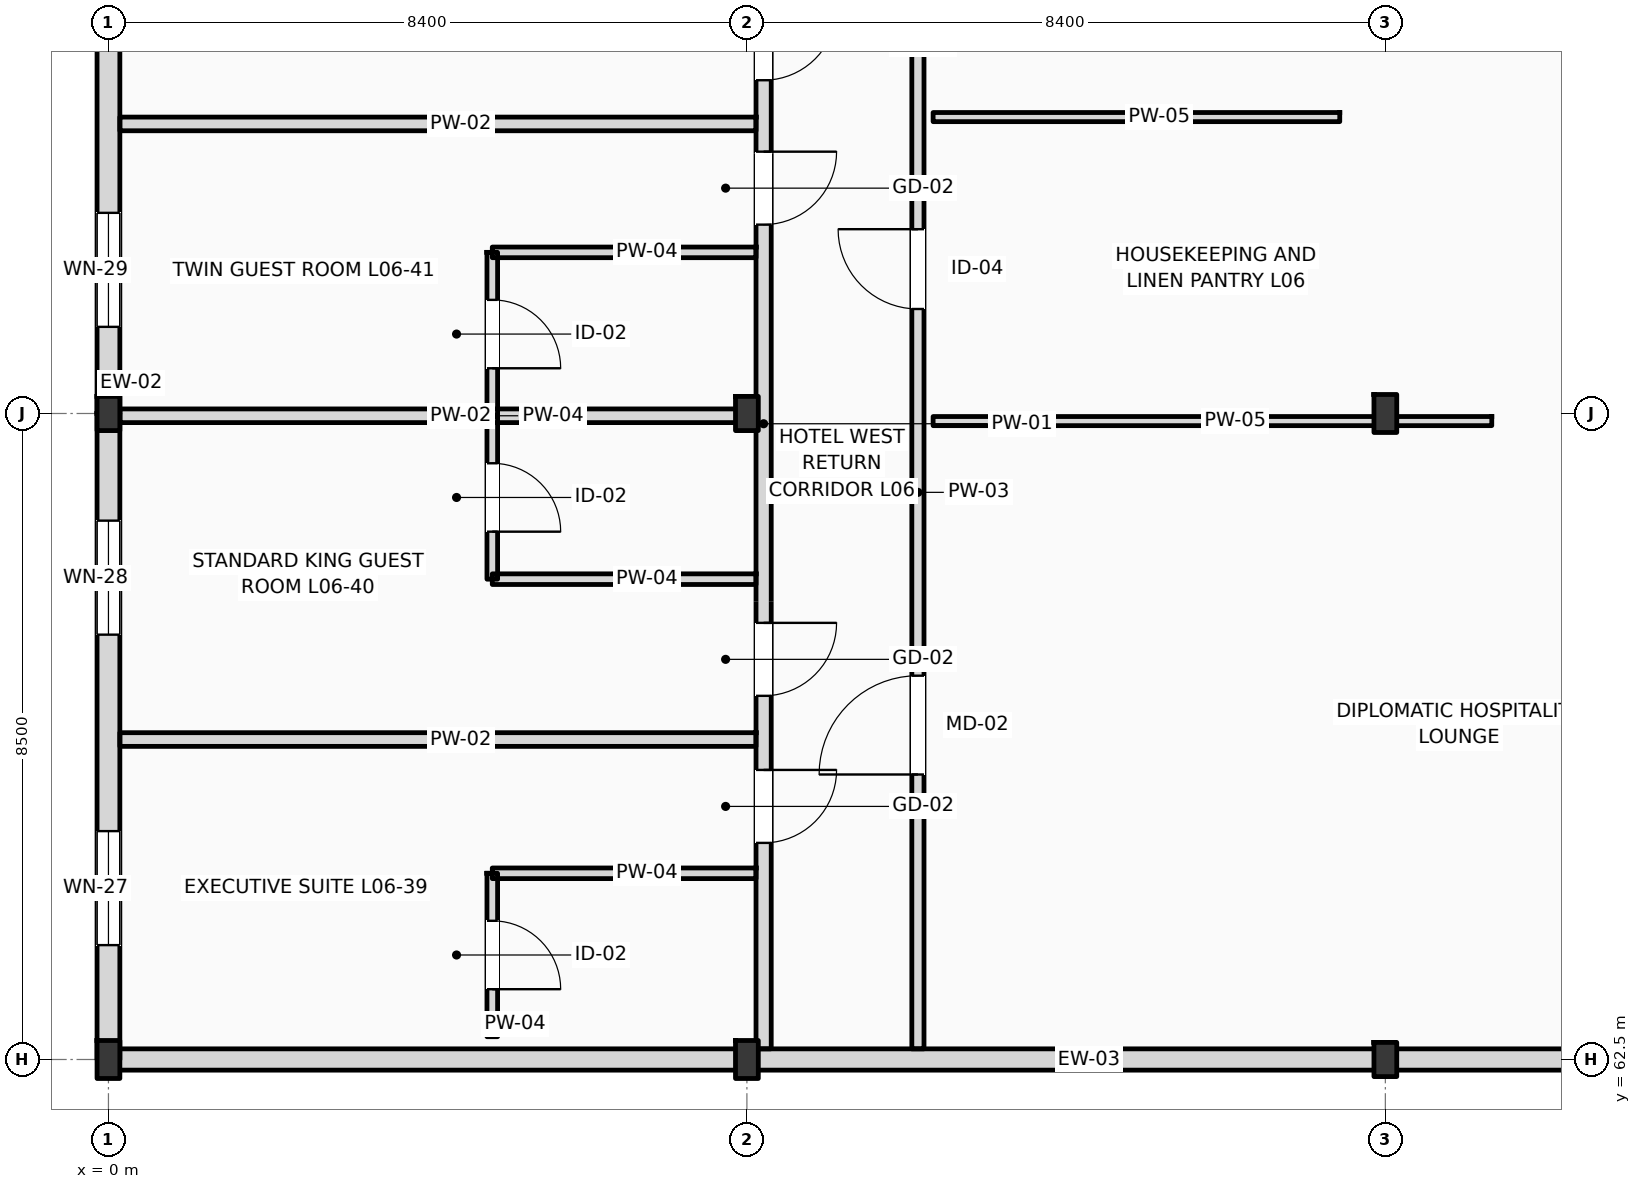
"""IFC4 building model, lengths in metres.
Left out: names, types, materials, properties, quantities, classifications, styles, units other than length and angle.
Written with IfcOpenShell. Run it as: python <this file> out.ifc"""

import sys

from ifc_helpers import new_model, si_unit, direction, frame, frame_2d, origin, origin_2d, place, context, subcontext, project, spatial, rectangle, i_section, extrude, element, fill, save


model = new_model("IFC4")
c1 = context("Model", 3, precision=1e-05, world=origin(), true_north=direction((0.0, 1.0)))
c2 = subcontext(c1, "Body", "Model", "MODEL_VIEW")
j1 = project(units=[si_unit("LENGTHUNIT", "METRE"), si_unit("PLANEANGLEUNIT", "RADIAN")], contexts=[c1])
p1 = place(None, origin())
s1 = spatial("IfcSite", under=j1, at=p1, CompositionType="ELEMENT")
p2 = place(p1, origin())
s2 = spatial("IfcBuilding", under=s1, at=p2, CompositionType="ELEMENT")
p3 = place(p2, frame((0.0, 0.0, 28.2)))
s3 = spatial("IfcBuildingStorey", under=s2, at=p3, CompositionType="ELEMENT", Elevation=28.2)
p4 = place(p3, frame((0.0, 62.5, 0.0), z_axis=(0.0, 0.0, 1.0), x_axis=(1.0, 0.0, 0.0)))
e1 = element("IfcColumn", 1, at=p4, inside=s3, PredefinedType="COLUMN", context=c2, shape_type="SweptSolid", body=[
    extrude(i_section(OverallWidth=0.3, OverallDepth=0.5, WebThickness=0.014, FlangeThickness=0.028, FilletRadius=0.027, at=origin_2d()), origin(), (0.0, 0.0, 1.0), 3.6),
])
p5 = place(p3, frame((0.0, 71.0, 0.0), z_axis=(0.0, 0.0, 1.0), x_axis=(1.0, 0.0, 0.0)))
e2 = element("IfcColumn", 2, at=p5, inside=s3, PredefinedType="COLUMN", context=c2, shape_type="SweptSolid", body=[
    extrude(i_section(OverallWidth=0.3, OverallDepth=0.45, WebThickness=0.014, FlangeThickness=0.026, FilletRadius=0.027, at=origin_2d()), origin(), (0.0, 0.0, 1.0), 3.6),
])
p6 = place(p3, frame((8.4, 62.5, 0.0), z_axis=(0.0, 0.0, 1.0), x_axis=(1.0, 0.0, 0.0)))
e3 = element("IfcColumn", 3, at=p6, inside=s3, PredefinedType="COLUMN", context=c2, shape_type="SweptSolid", body=[
    extrude(i_section(OverallWidth=0.3, OverallDepth=0.5, WebThickness=0.014, FlangeThickness=0.028, FilletRadius=0.027, at=origin_2d()), origin(), (0.0, 0.0, 1.0), 3.6),
])
for number, where, z_axis, x_axis in (
    (4, (8.4, 71.0, 0.0), (0.0, 0.0, 1.0), (1.0, 0.0, 0.0)),
    (5, (16.8, 62.5, 0.0), (0.0, 0.0, 1.0), (1.0, 0.0, 0.0)),
):
    element("IfcColumn", number, at=place(p3, frame(where, z_axis=z_axis, x_axis=x_axis)), inside=s3, PredefinedType="COLUMN", context=c2, shape_type="SweptSolid", body=[
        extrude(i_section(OverallWidth=0.3, OverallDepth=0.45, WebThickness=0.014, FlangeThickness=0.026, FilletRadius=0.027, at=origin_2d()), origin(), (0.0, 0.0, 1.0), 3.6),
    ])
p7 = place(p3, frame((16.8, 71.0, 0.0), z_axis=(0.0, 0.0, 1.0), x_axis=(1.0, 0.0, 0.0)))
e6 = element("IfcColumn", 6, at=p7, inside=s3, PredefinedType="COLUMN", context=c2, shape_type="SweptSolid", body=[
    extrude(i_section(OverallWidth=0.3, OverallDepth=0.5, WebThickness=0.014, FlangeThickness=0.028, FilletRadius=0.027, at=origin_2d()), origin(), (0.0, 0.0, 1.0), 3.6),
])
p8 = place(p3, frame((0.0, 62.5, 0.0), z_axis=(0.0, 0.0, 1.0), x_axis=(0.0, 1.0, 0.0)))
e7 = element("IfcWall", 7, at=p8, inside=s3, PredefinedType="STANDARD", context=c2, shape_type="SweptSolid", body=[
    extrude(rectangle(XDim=8.5, YDim=0.3, at=frame_2d((4.25, 0.0))), origin(), (0.0, 0.0, 1.0), 2.99),
])
p9 = place(p8, frame((1.505, 0.0, 0.9)))
e8 = element("IfcOpeningElement", 8, at=p9, cuts=e7, PredefinedType="OPENING", context=c2, shape_type="SweptSolid", body=[
    extrude(rectangle(XDim=1.5, YDim=1.91, at=frame_2d((0.75, 0.955))), frame((0.0, 0.16, 0.0), z_axis=(0.0, -1.0, 0.0), x_axis=(1.0, 0.0, 0.0)), (0.0, 0.0, 1.0), 0.32),
])
p10 = place(p8, frame((5.59, 0.0, 0.9)))
e9 = element("IfcOpeningElement", 9, at=p10, cuts=e7, PredefinedType="OPENING", context=c2, shape_type="SweptSolid", body=[
    extrude(rectangle(XDim=1.5, YDim=1.91, at=frame_2d((0.75, 0.955))), frame((0.0, 0.16, 0.0), z_axis=(0.0, -1.0, 0.0), x_axis=(1.0, 0.0, 0.0)), (0.0, 0.0, 1.0), 0.32),
])
p11 = place(p3, frame((0.0, 71.0, 0.0), z_axis=(0.0, 0.0, 1.0), x_axis=(0.0, 1.0, 0.0)))
e10 = element("IfcWall", 10, at=p11, inside=s3, PredefinedType="STANDARD", context=c2, shape_type="SweptSolid", body=[
    extrude(rectangle(XDim=8.5, YDim=0.3, at=frame_2d((4.25, 0.0))), origin(), (0.0, 0.0, 1.0), 2.99),
])
p12 = place(p11, frame((1.14, 0.0, 0.9)))
e11 = element("IfcOpeningElement", 11, at=p12, cuts=e10, PredefinedType="OPENING", context=c2, shape_type="SweptSolid", body=[
    extrude(rectangle(XDim=1.5, YDim=1.91, at=frame_2d((0.75, 0.955))), frame((0.0, 0.16, 0.0), z_axis=(0.0, -1.0, 0.0), x_axis=(1.0, 0.0, 0.0)), (0.0, 0.0, 1.0), 0.32),
])
p13 = place(p11, frame((5.19, 0.0, 0.9)))
e12 = element("IfcOpeningElement", 12, at=p13, cuts=e10, PredefinedType="OPENING", context=c2, shape_type="SweptSolid", body=[
    extrude(rectangle(XDim=1.5, YDim=1.91, at=frame_2d((0.75, 0.955))), frame((0.0, 0.16, 0.0), z_axis=(0.0, -1.0, 0.0), x_axis=(1.0, 0.0, 0.0)), (0.0, 0.0, 1.0), 0.32),
])
p14 = place(p3, frame((0.0, 62.5, 0.0), z_axis=(0.0, 0.0, 1.0), x_axis=(1.0, 0.0, 0.0)))
e13 = element("IfcWall", 13, at=p14, inside=s3, PredefinedType="STANDARD", context=c2, shape_type="SweptSolid", body=[
    extrude(rectangle(XDim=25.2, YDim=0.28, at=frame_2d((12.6, 0.0))), origin(), (0.0, 0.0, 1.0), 2.8),
])
p15 = place(p3, frame((8.62, 62.64, 0.0), z_axis=(0.0, 0.0, 1.0), x_axis=(0.0, 1.0, 0.0)))
e14 = element("IfcWall", 14, at=p15, inside=s3, PredefinedType="PARTITIONING", context=c2, shape_type="SweptSolid", body=[
    extrude(rectangle(XDim=32.66, YDim=0.2, at=frame_2d((16.33, 0.0))), origin(), (0.0, 0.0, 1.0), 2.99),
])
p16 = place(p15, frame((2.71, 0.0, 0.0)))
e15 = element("IfcOpeningElement", 15, at=p16, cuts=e14, PredefinedType="OPENING", context=c2, shape_type="SweptSolid", body=[
    extrude(rectangle(XDim=0.96, YDim=2.2, at=frame_2d((0.48, 1.1))), frame((0.0, 0.11, 0.0), z_axis=(0.0, -1.0, 0.0), x_axis=(1.0, 0.0, 0.0)), (0.0, 0.0, 1.0), 0.22),
])
p17 = place(p15, frame((4.645, 0.0, 0.0)))
e16 = element("IfcOpeningElement", 16, at=p17, cuts=e14, PredefinedType="OPENING", context=c2, shape_type="SweptSolid", body=[
    extrude(rectangle(XDim=0.96, YDim=2.2, at=frame_2d((0.48, 1.1))), frame((0.0, 0.11, 0.0), z_axis=(0.0, -1.0, 0.0), x_axis=(1.0, 0.0, 0.0)), (0.0, 0.0, 1.0), 0.22),
])
p18 = place(p15, frame((10.845, 0.0, 0.0)))
e17 = element("IfcOpeningElement", 17, at=p18, cuts=e14, PredefinedType="OPENING", context=c2, shape_type="SweptSolid", body=[
    extrude(rectangle(XDim=0.96, YDim=2.2, at=frame_2d((0.48, 1.1))), frame((0.0, 0.11, 0.0), z_axis=(0.0, -1.0, 0.0), x_axis=(1.0, 0.0, 0.0)), (0.0, 0.0, 1.0), 0.22),
])
p19 = place(p15, frame((12.745, 0.0, 0.0)))
e18 = element("IfcOpeningElement", 18, at=p19, cuts=e14, PredefinedType="OPENING", context=c2, shape_type="SweptSolid", body=[
    extrude(rectangle(XDim=0.96, YDim=2.2, at=frame_2d((0.48, 1.1))), frame((0.0, 0.11, 0.0), z_axis=(0.0, -1.0, 0.0), x_axis=(1.0, 0.0, 0.0)), (0.0, 0.0, 1.0), 0.22),
])
p20 = place(p15, frame((18.945, 0.0, 0.0)))
e19 = element("IfcOpeningElement", 19, at=p20, cuts=e14, PredefinedType="OPENING", context=c2, shape_type="SweptSolid", body=[
    extrude(rectangle(XDim=0.96, YDim=2.2, at=frame_2d((0.48, 1.1))), frame((0.0, 0.11, 0.0), z_axis=(0.0, -1.0, 0.0), x_axis=(1.0, 0.0, 0.0)), (0.0, 0.0, 1.0), 0.22),
])
p21 = place(p15, frame((22.995, 0.0, 0.0)))
e20 = element("IfcOpeningElement", 20, at=p21, cuts=e14, PredefinedType="OPENING", context=c2, shape_type="SweptSolid", body=[
    extrude(rectangle(XDim=0.96, YDim=2.2, at=frame_2d((0.48, 1.1))), frame((0.0, 0.11, 0.0), z_axis=(0.0, -1.0, 0.0), x_axis=(1.0, 0.0, 0.0)), (0.0, 0.0, 1.0), 0.22),
])
p22 = place(p15, frame((27.045, 0.0, 0.0)))
e21 = element("IfcOpeningElement", 21, at=p22, cuts=e14, PredefinedType="OPENING", context=c2, shape_type="SweptSolid", body=[
    extrude(rectangle(XDim=0.96, YDim=2.2, at=frame_2d((0.48, 1.1))), frame((0.0, 0.11, 0.0), z_axis=(0.0, -1.0, 0.0), x_axis=(1.0, 0.0, 0.0)), (0.0, 0.0, 1.0), 0.22),
])
p23 = place(p15, frame((31.06, 0.0, 0.0)))
e22 = element("IfcOpeningElement", 22, at=p23, cuts=e14, PredefinedType="OPENING", context=c2, shape_type="SweptSolid", body=[
    extrude(rectangle(XDim=0.96, YDim=2.2, at=frame_2d((0.48, 1.1))), frame((0.0, 0.11, 0.0), z_axis=(0.0, -1.0, 0.0), x_axis=(1.0, 0.0, 0.0)), (0.0, 0.0, 1.0), 0.22),
])
p24 = place(p3, frame((10.65, 62.64, 0.0), z_axis=(0.0, 0.0, 1.0), x_axis=(0.0, 1.0, 0.0)))
e23 = element("IfcWall", 23, at=p24, inside=s3, PredefinedType="PARTITIONING", context=c2, shape_type="SweptSolid", body=[
    extrude(rectangle(XDim=16.31, YDim=0.16, at=frame_2d((8.155, 0.0))), origin(), (0.0, 0.0, 1.0), 3.36),
])
p25 = place(p24, frame((3.61, 0.0, 0.0)))
e24 = element("IfcOpeningElement", 24, at=p25, cuts=e23, PredefinedType="OPENING", context=c2, shape_type="SweptSolid", body=[
    extrude(rectangle(XDim=1.3, YDim=2.2, at=frame_2d((0.65, 1.1))), frame((0.0, 0.09, 0.0), z_axis=(0.0, -1.0, 0.0), x_axis=(1.0, 0.0, 0.0)), (0.0, 0.0, 1.0), 0.18),
])
p26 = place(p24, frame((9.735, 0.0, 0.0)))
e25 = element("IfcOpeningElement", 25, at=p26, cuts=e23, PredefinedType="OPENING", context=c2, shape_type="SweptSolid", body=[
    extrude(rectangle(XDim=1.05, YDim=2.12, at=frame_2d((0.525, 1.06))), frame((0.0, 0.09, 0.0), z_axis=(0.0, -1.0, 0.0), x_axis=(1.0, 0.0, 0.0)), (0.0, 0.0, 1.0), 0.18),
])
p27 = place(p24, frame((13.49, 0.0, 0.0)))
e26 = element("IfcOpeningElement", 26, at=p27, cuts=e23, PredefinedType="OPENING", context=c2, shape_type="SweptSolid", body=[
    extrude(rectangle(XDim=0.94, YDim=2.15, at=frame_2d((0.47, 1.075))), frame((0.0, 0.09, 0.0), z_axis=(0.0, -1.0, 0.0), x_axis=(1.0, 0.0, 0.0)), (0.0, 0.0, 1.0), 0.18),
])
p28 = place(p3, frame((0.15, 66.71, 0.0), z_axis=(0.0, 0.0, 1.0), x_axis=(1.0, 0.0, 0.0)))
e27 = element("IfcWall", 27, at=p28, inside=s3, PredefinedType="PARTITIONING", context=c2, shape_type="SweptSolid", body=[
    extrude(rectangle(XDim=8.37, YDim=0.18, at=frame_2d((4.185, 0.0))), origin(), (0.0, 0.0, 1.0), 3.36),
])
p29 = place(p3, frame((5.05, 64.95, 0.0), z_axis=(0.0, 0.0, 1.0), x_axis=(1.0, 0.0, 0.0)))
e28 = element("IfcWall", 28, at=p29, inside=s3, PredefinedType="PARTITIONING", context=c2, shape_type="SweptSolid", body=[
    extrude(rectangle(XDim=3.47, YDim=0.14, at=frame_2d((1.735, 0.0))), origin(), (0.0, 0.0, 1.0), 3.36),
])
p30 = place(p3, frame((5.05, 62.8, 0.0), z_axis=(0.0, 0.0, 1.0), x_axis=(0.0, 1.0, 0.0)))
e29 = element("IfcWall", 29, at=p30, inside=s3, PredefinedType="PARTITIONING", context=c2, shape_type="SweptSolid", body=[
    extrude(rectangle(XDim=2.15, YDim=0.14, at=frame_2d((1.075, 0.0))), origin(), (0.0, 0.0, 1.0), 3.36),
])
p31 = place(p30, frame((0.625, 0.0, 0.0)))
e30 = element("IfcOpeningElement", 30, at=p31, cuts=e29, PredefinedType="OPENING", context=c2, shape_type="SweptSolid", body=[
    extrude(rectangle(XDim=0.9, YDim=2.1, at=frame_2d((0.45, 1.05))), frame((0.0, 0.08, 0.0), z_axis=(0.0, -1.0, 0.0), x_axis=(1.0, 0.0, 0.0)), (0.0, 0.0, 1.0), 0.16),
])
p32 = place(p3, frame((0.15, 70.97, 0.0), z_axis=(0.0, 0.0, 1.0), x_axis=(1.0, 0.0, 0.0)))
e31 = element("IfcWall", 31, at=p32, inside=s3, PredefinedType="PARTITIONING", context=c2, shape_type="SweptSolid", body=[
    extrude(rectangle(XDim=8.37, YDim=0.18, at=frame_2d((4.185, 0.0))), origin(), (0.0, 0.0, 1.0), 2.8),
])
p33 = place(p3, frame((5.05, 68.82, 0.0), z_axis=(0.0, 0.0, 1.0), x_axis=(1.0, 0.0, 0.0)))
e32 = element("IfcWall", 32, at=p33, inside=s3, PredefinedType="PARTITIONING", context=c2, shape_type="SweptSolid", body=[
    extrude(rectangle(XDim=3.47, YDim=0.14, at=frame_2d((1.735, 0.0))), origin(), (0.0, 0.0, 1.0), 3.36),
])
p34 = place(p3, frame((5.05, 68.82, 0.0), z_axis=(0.0, 0.0, 1.0), x_axis=(0.0, 1.0, 0.0)))
e33 = element("IfcWall", 33, at=p34, inside=s3, PredefinedType="PARTITIONING", context=c2, shape_type="SweptSolid", body=[
    extrude(rectangle(XDim=2.15, YDim=0.14, at=frame_2d((1.075, 0.0))), origin(), (0.0, 0.0, 1.0), 3.36),
])
p35 = place(p34, frame((0.625, 0.0, 0.0)))
e34 = element("IfcOpeningElement", 34, at=p35, cuts=e33, PredefinedType="OPENING", context=c2, shape_type="SweptSolid", body=[
    extrude(rectangle(XDim=0.9, YDim=2.1, at=frame_2d((0.45, 1.05))), frame((0.0, 0.08, 0.0), z_axis=(0.0, -1.0, 0.0), x_axis=(1.0, 0.0, 0.0)), (0.0, 0.0, 1.0), 0.16),
])
p36 = place(p3, frame((0.15, 74.81, 0.0), z_axis=(0.0, 0.0, 1.0), x_axis=(1.0, 0.0, 0.0)))
e35 = element("IfcWall", 35, at=p36, inside=s3, PredefinedType="PARTITIONING", context=c2, shape_type="SweptSolid", body=[
    extrude(rectangle(XDim=8.37, YDim=0.18, at=frame_2d((4.185, 0.0))), origin(), (0.0, 0.0, 1.0), 3.36),
])
p37 = place(p3, frame((5.05, 73.12, 0.0), z_axis=(0.0, 0.0, 1.0), x_axis=(1.0, 0.0, 0.0)))
e36 = element("IfcWall", 36, at=p37, inside=s3, PredefinedType="PARTITIONING", context=c2, shape_type="SweptSolid", body=[
    extrude(rectangle(XDim=3.47, YDim=0.14, at=frame_2d((1.735, 0.0))), origin(), (0.0, 0.0, 1.0), 3.36),
])
p38 = place(p3, frame((5.05, 70.97, 0.0), z_axis=(0.0, 0.0, 1.0), x_axis=(0.0, 1.0, 0.0)))
e37 = element("IfcWall", 37, at=p38, inside=s3, PredefinedType="PARTITIONING", context=c2, shape_type="SweptSolid", body=[
    extrude(rectangle(XDim=2.15, YDim=0.14, at=frame_2d((1.075, 0.0))), origin(), (0.0, 0.0, 1.0), 3.36),
])
p39 = place(p38, frame((0.625, 0.0, 0.0)))
e38 = element("IfcOpeningElement", 38, at=p39, cuts=e37, PredefinedType="OPENING", context=c2, shape_type="SweptSolid", body=[
    extrude(rectangle(XDim=0.9, YDim=2.1, at=frame_2d((0.45, 1.05))), frame((0.0, 0.08, 0.0), z_axis=(0.0, -1.0, 0.0), x_axis=(1.0, 0.0, 0.0)), (0.0, 0.0, 1.0), 0.16),
])
p40 = place(p3, frame((10.85, 70.9, 0.0), z_axis=(0.0, 0.0, 1.0), x_axis=(1.0, 0.0, 0.0)))
e39 = element("IfcWall", 39, at=p40, inside=s3, PredefinedType="PARTITIONING", context=c2, shape_type="SweptSolid", body=[
    extrude(rectangle(XDim=7.35, YDim=0.12, at=frame_2d((3.675, 0.0))), origin(), (0.0, 0.0, 1.0), 2.8),
])
p41 = place(p3, frame((10.85, 74.9, 0.0), z_axis=(0.0, 0.0, 1.0), x_axis=(1.0, 0.0, 0.0)))
e40 = element("IfcWall", 40, at=p41, inside=s3, PredefinedType="PARTITIONING", context=c2, shape_type="SweptSolid", body=[
    extrude(rectangle(XDim=5.35, YDim=0.12, at=frame_2d((2.675, 0.0))), origin(), (0.0, 0.0, 1.0), 3.36),
])
p42 = place(p9, origin())
e41 = element("IfcWindow", 41, at=p42, inside=s3, PartitioningType="DOUBLE_PANEL_VERTICAL", PredefinedType="WINDOW", context=c2, shape_type="SweptSolid", body=[
    extrude(rectangle(XDim=1.5, YDim=1.91, at=frame_2d((0.75, 0.955))), frame((0.0, 0.03, 0.0), z_axis=(0.0, -1.0, 0.0), x_axis=(1.0, 0.0, 0.0)), (0.0, 0.0, 1.0), 0.06),
])
fill(e8, e41)
p43 = place(p10, origin())
e42 = element("IfcWindow", 42, at=p43, inside=s3, PartitioningType="DOUBLE_PANEL_VERTICAL", PredefinedType="WINDOW", context=c2, shape_type="SweptSolid", body=[
    extrude(rectangle(XDim=1.5, YDim=1.91, at=frame_2d((0.75, 0.955))), frame((0.0, 0.03, 0.0), z_axis=(0.0, -1.0, 0.0), x_axis=(1.0, 0.0, 0.0)), (0.0, 0.0, 1.0), 0.06),
])
fill(e9, e42)
p44 = place(p12, origin())
e43 = element("IfcWindow", 43, at=p44, inside=s3, PartitioningType="DOUBLE_PANEL_VERTICAL", PredefinedType="WINDOW", context=c2, shape_type="SweptSolid", body=[
    extrude(rectangle(XDim=1.5, YDim=1.91, at=frame_2d((0.75, 0.955))), frame((0.0, 0.03, 0.0), z_axis=(0.0, -1.0, 0.0), x_axis=(1.0, 0.0, 0.0)), (0.0, 0.0, 1.0), 0.06),
])
fill(e11, e43)
p45 = place(p16, frame((0.96, 0.0, 0.0), z_axis=(0.0, 0.0, 1.0), x_axis=(-1.0, 0.0, 0.0)))
e44 = element("IfcDoor", 44, at=p45, inside=s3, OperationType="SINGLE_SWING_RIGHT", PredefinedType="DOOR", context=c2, shape_type="SweptSolid", body=[
    extrude(rectangle(XDim=0.96, YDim=2.2, at=frame_2d((0.48, 1.1))), frame((0.0, 0.025, 0.0), z_axis=(0.0, -1.0, 0.0), x_axis=(1.0, 0.0, 0.0)), (0.0, 0.0, 1.0), 0.05),
])
fill(e15, e44)
p46 = place(p31, frame((0.9, 0.0, 0.0), z_axis=(0.0, 0.0, 1.0), x_axis=(-1.0, 0.0, 0.0)))
e45 = element("IfcDoor", 45, at=p46, inside=s3, OperationType="SINGLE_SWING_LEFT", PredefinedType="DOOR", context=c2, shape_type="SweptSolid", body=[
    extrude(rectangle(XDim=0.9, YDim=2.1, at=frame_2d((0.45, 1.05))), frame((0.0, 0.025, 0.0), z_axis=(0.0, -1.0, 0.0), x_axis=(1.0, 0.0, 0.0)), (0.0, 0.0, 1.0), 0.05),
])
fill(e30, e45)
p47 = place(p17, frame((0.96, 0.0, 0.0), z_axis=(0.0, 0.0, 1.0), x_axis=(-1.0, 0.0, 0.0)))
e46 = element("IfcDoor", 46, at=p47, inside=s3, OperationType="SINGLE_SWING_RIGHT", PredefinedType="DOOR", context=c2, shape_type="SweptSolid", body=[
    extrude(rectangle(XDim=0.96, YDim=2.2, at=frame_2d((0.48, 1.1))), frame((0.0, 0.025, 0.0), z_axis=(0.0, -1.0, 0.0), x_axis=(1.0, 0.0, 0.0)), (0.0, 0.0, 1.0), 0.05),
])
fill(e16, e46)
p48 = place(p35, frame((0.9, 0.0, 0.0), z_axis=(0.0, 0.0, 1.0), x_axis=(-1.0, 0.0, 0.0)))
e47 = element("IfcDoor", 47, at=p48, inside=s3, OperationType="SINGLE_SWING_LEFT", PredefinedType="DOOR", context=c2, shape_type="SweptSolid", body=[
    extrude(rectangle(XDim=0.9, YDim=2.1, at=frame_2d((0.45, 1.05))), frame((0.0, 0.025, 0.0), z_axis=(0.0, -1.0, 0.0), x_axis=(1.0, 0.0, 0.0)), (0.0, 0.0, 1.0), 0.05),
])
fill(e34, e47)
p49 = place(p18, frame((0.96, 0.0, 0.0), z_axis=(0.0, 0.0, 1.0), x_axis=(-1.0, 0.0, 0.0)))
e48 = element("IfcDoor", 48, at=p49, inside=s3, OperationType="SINGLE_SWING_RIGHT", PredefinedType="DOOR", context=c2, shape_type="SweptSolid", body=[
    extrude(rectangle(XDim=0.96, YDim=2.2, at=frame_2d((0.48, 1.1))), frame((0.0, 0.025, 0.0), z_axis=(0.0, -1.0, 0.0), x_axis=(1.0, 0.0, 0.0)), (0.0, 0.0, 1.0), 0.05),
])
fill(e17, e48)
p50 = place(p39, frame((0.9, 0.0, 0.0), z_axis=(0.0, 0.0, 1.0), x_axis=(-1.0, 0.0, 0.0)))
e49 = element("IfcDoor", 49, at=p50, inside=s3, OperationType="SINGLE_SWING_LEFT", PredefinedType="DOOR", context=c2, shape_type="SweptSolid", body=[
    extrude(rectangle(XDim=0.9, YDim=2.1, at=frame_2d((0.45, 1.05))), frame((0.0, 0.025, 0.0), z_axis=(0.0, -1.0, 0.0), x_axis=(1.0, 0.0, 0.0)), (0.0, 0.0, 1.0), 0.05),
])
fill(e38, e49)
p51 = place(p19, frame((0.96, 0.0, 0.0), z_axis=(0.0, 0.0, 1.0), x_axis=(-1.0, 0.0, 0.0)))
e50 = element("IfcDoor", 50, at=p51, inside=s3, OperationType="SINGLE_SWING_RIGHT", PredefinedType="DOOR", context=c2, shape_type="SweptSolid", body=[
    extrude(rectangle(XDim=0.96, YDim=2.2, at=frame_2d((0.48, 1.1))), frame((0.0, 0.025, 0.0), z_axis=(0.0, -1.0, 0.0), x_axis=(1.0, 0.0, 0.0)), (0.0, 0.0, 1.0), 0.05),
])
fill(e18, e50)
p52 = place(p25, origin())
e51 = element("IfcDoor", 51, at=p52, inside=s3, OperationType="SINGLE_SWING_LEFT", PredefinedType="DOOR", context=c2, shape_type="SweptSolid", body=[
    extrude(rectangle(XDim=1.3, YDim=2.2, at=frame_2d((0.65, 1.1))), frame((0.0, 0.025, 0.0), z_axis=(0.0, -1.0, 0.0), x_axis=(1.0, 0.0, 0.0)), (0.0, 0.0, 1.0), 0.05),
])
fill(e24, e51)
p53 = place(p26, origin())
e52 = element("IfcDoor", 52, at=p53, inside=s3, OperationType="SINGLE_SWING_RIGHT", PredefinedType="DOOR", context=c2, shape_type="SweptSolid", body=[
    extrude(rectangle(XDim=1.05, YDim=2.12, at=frame_2d((0.525, 1.06))), frame((0.0, 0.025, 0.0), z_axis=(0.0, -1.0, 0.0), x_axis=(1.0, 0.0, 0.0)), (0.0, 0.0, 1.0), 0.05),
])
fill(e25, e52)
save(model, sys.argv[1])
